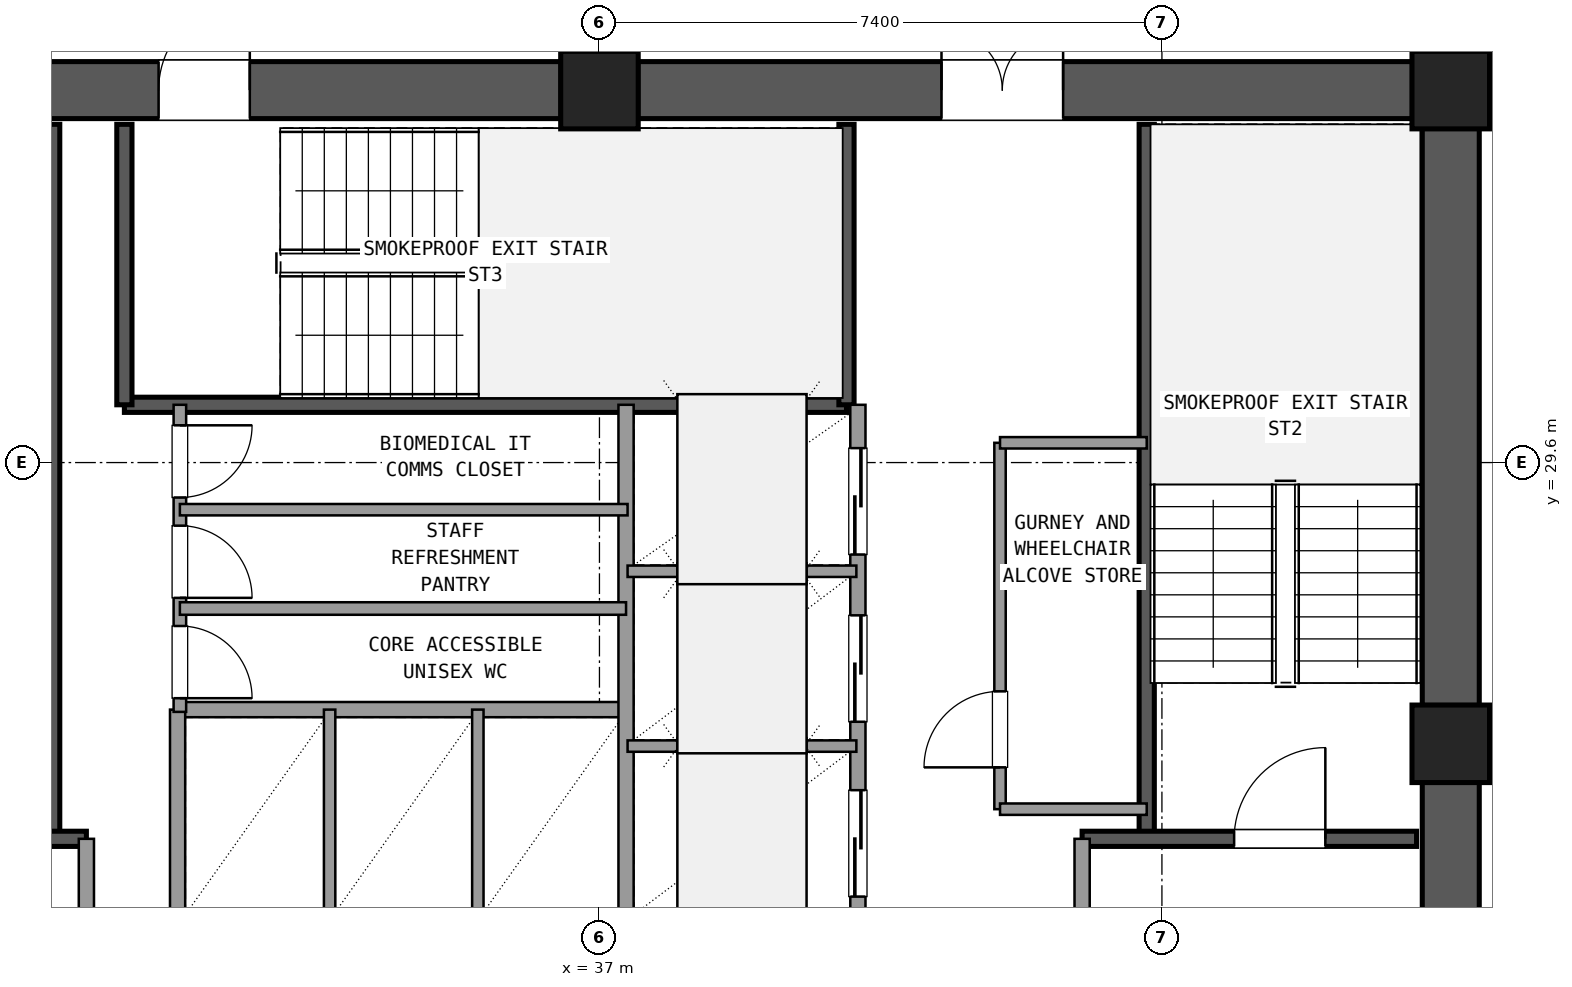
"""IFC4 building model, lengths in metres.
Left out: names, types, materials, properties, quantities, classifications, styles, units other than length and angle.
Written with IfcOpenShell. Run it as: python <this file> out.ifc"""

import sys

from ifc_helpers import new_model, si_unit, direction, frame, frame_2d, origin, origin_2d, place, context, subcontext, project, spatial, rectangle, extrude, element, fill, save


model = new_model("IFC4")
c1 = context("Model", 3, precision=1e-05, world=origin(), true_north=direction((0.0, 1.0)))
c2 = subcontext(c1, "Body", "Model", "MODEL_VIEW")
j1 = project(units=[si_unit("LENGTHUNIT", "METRE"), si_unit("PLANEANGLEUNIT", "RADIAN")], contexts=[c1])
p1 = place(None, origin())
s1 = spatial("IfcSite", under=j1, at=p1, CompositionType="ELEMENT")
p2 = place(p1, origin())
s2 = spatial("IfcBuilding", under=s1, at=p2, CompositionType="ELEMENT")
p3 = place(p2, frame((0.0, 0.0, 174.42)))
s3 = spatial("IfcBuildingStorey", under=s2, at=p3, CompositionType="ELEMENT", Elevation=174.42)
for number, where, z_axis, x_axis in (
    (1, (48.2, 25.9, 0.0), (0.0, 0.0, 1.0), (1.0, 0.0, 0.0)),
    (2, (48.2, 34.5, 0.0), (0.0, 0.0, 1.0), (1.0, 0.0, 0.0)),
    (3, (37.0, 34.5, 0.0), (0.0, 0.0, 1.0), (1.0, 0.0, 0.0)),
):
    element("IfcColumn", number, at=place(p3, frame(where, z_axis=z_axis, x_axis=x_axis)), inside=s3, PredefinedType="COLUMN", context=c2, shape_type="SweptSolid", body=[
        extrude(rectangle(XDim=1.02, YDim=1.02, at=origin_2d()), origin(), (0.0, 0.0, 1.0), 3.6),
    ])
p4 = place(p3, frame((48.2, 17.805, 0.0), z_axis=(0.0, 0.0, 1.0), x_axis=(0.0, 1.0, 0.0)))
e4 = element("IfcWall", 4, at=p4, inside=s3, PredefinedType="SHEAR", context=c2, shape_type="SweptSolid", body=[
    extrude(rectangle(XDim=7.59, YDim=0.75, at=frame_2d((3.795, 0.0))), origin(), (0.0, 0.0, 1.0), 3.3),
])
p5 = place(p4, frame((4.245, 0.0, 0.0)))
e5 = element("IfcOpeningElement", 5, at=p5, cuts=e4, PredefinedType="OPENING", context=c2, shape_type="SweptSolid", body=[
    extrude(rectangle(XDim=1.2, YDim=2.15, at=frame_2d((0.6, 1.075))), frame((0.0, 0.385, 0.0), z_axis=(0.0, -1.0, 0.0), x_axis=(1.0, 0.0, 0.0)), (0.0, 0.0, 1.0), 0.77),
])
p6 = place(p3, frame((48.2, 26.405, 0.0), z_axis=(0.0, 0.0, 1.0), x_axis=(0.0, 1.0, 0.0)))
e6 = element("IfcWall", 6, at=p6, inside=s3, PredefinedType="SHEAR", context=c2, shape_type="SweptSolid", body=[
    extrude(rectangle(XDim=7.59, YDim=0.75, at=frame_2d((3.795, 0.0))), origin(), (0.0, 0.0, 1.0), 3.3),
])
p7 = place(p3, frame((47.695, 34.5, 0.0), z_axis=(0.0, 0.0, 1.0), x_axis=(-1.0, 0.0, 0.0)))
e7 = element("IfcWall", 7, at=p7, inside=s3, PredefinedType="SHEAR", context=c2, shape_type="SweptSolid", body=[
    extrude(rectangle(XDim=10.19, YDim=0.75, at=frame_2d((5.095, 0.0))), origin(), (0.0, 0.0, 1.0), 3.3),
])
p8 = place(p7, frame((4.595, 0.0, 0.0)))
e8 = element("IfcOpeningElement", 8, at=p8, cuts=e7, PredefinedType="OPENING", context=c2, shape_type="SweptSolid", body=[
    extrude(rectangle(XDim=1.6, YDim=2.2, at=frame_2d((0.8, 1.1))), frame((0.0, 0.385, 0.0), z_axis=(0.0, -1.0, 0.0), x_axis=(1.0, 0.0, 0.0)), (0.0, 0.0, 1.0), 0.77),
])
p9 = place(p3, frame((36.495, 34.5, 0.0), z_axis=(0.0, 0.0, 1.0), x_axis=(-1.0, 0.0, 0.0)))
e9 = element("IfcWall", 9, at=p9, inside=s3, PredefinedType="SHEAR", context=c2, shape_type="SweptSolid", body=[
    extrude(rectangle(XDim=10.19, YDim=0.75, at=frame_2d((5.095, 0.0))), origin(), (0.0, 0.0, 1.0), 3.3),
])
p10 = place(p9, frame((4.095, 0.0, 0.0)))
e10 = element("IfcOpeningElement", 10, at=p10, cuts=e9, PredefinedType="OPENING", context=c2, shape_type="SweptSolid", body=[
    extrude(rectangle(XDim=1.2, YDim=2.15, at=frame_2d((0.6, 1.075))), frame((0.0, 0.385, 0.0), z_axis=(0.0, -1.0, 0.0), x_axis=(1.0, 0.0, 0.0)), (0.0, 0.0, 1.0), 0.77),
])
p11 = place(p3, frame((29.8, 24.65, 0.0), z_axis=(0.0, 0.0, 1.0), x_axis=(0.0, 1.0, 0.0)))
e11 = element("IfcWall", 11, at=p11, inside=s3, PredefinedType="SHEAR", context=c2, shape_type="SweptSolid", body=[
    extrude(rectangle(XDim=9.4, YDim=0.2, at=frame_2d((4.7, 0.0))), origin(), (0.0, 0.0, 1.0), 3.3),
])
p12 = place(p3, frame((26.25, 24.65, 0.0), z_axis=(0.0, 0.0, 1.0), x_axis=(1.0, 0.0, 0.0)))
e12 = element("IfcWall", 12, at=p12, inside=s3, PredefinedType="SHEAR", context=c2, shape_type="SweptSolid", body=[
    extrude(rectangle(XDim=4.0, YDim=0.2, at=frame_2d((2.0, 0.0))), origin(), (0.0, 0.0, 1.0), 3.3),
])
p13 = place(p12, frame((1.0, 0.0, 0.0)))
e13 = element("IfcOpeningElement", 13, at=p13, cuts=e12, PredefinedType="OPENING", context=c2, shape_type="SweptSolid", body=[
    extrude(rectangle(XDim=1.2, YDim=2.15, at=frame_2d((0.6, 1.075))), frame((0.0, 0.11, 0.0), z_axis=(0.0, -1.0, 0.0), x_axis=(1.0, 0.0, 0.0)), (0.0, 0.0, 1.0), 0.22),
])
p14 = place(p3, frame((44.2, 24.65, 0.0), z_axis=(0.0, 0.0, 1.0), x_axis=(0.0, 1.0, 0.0)))
e14 = element("IfcWall", 14, at=p14, inside=s3, PredefinedType="SHEAR", context=c2, shape_type="SweptSolid", body=[
    extrude(rectangle(XDim=9.4, YDim=0.2, at=frame_2d((4.7, 0.0))), origin(), (0.0, 0.0, 1.0), 3.3),
])
p15 = place(p3, frame((43.35, 24.65, 0.0), z_axis=(0.0, 0.0, 1.0), x_axis=(1.0, 0.0, 0.0)))
e15 = element("IfcWall", 15, at=p15, inside=s3, PredefinedType="SHEAR", context=c2, shape_type="SweptSolid", body=[
    extrude(rectangle(XDim=4.4, YDim=0.2, at=frame_2d((2.2, 0.0))), origin(), (0.0, 0.0, 1.0), 3.3),
])
p16 = place(p15, frame((2.0, 0.0, 0.0)))
e16 = element("IfcOpeningElement", 16, at=p16, cuts=e15, PredefinedType="OPENING", context=c2, shape_type="SweptSolid", body=[
    extrude(rectangle(XDim=1.2, YDim=2.15, at=frame_2d((0.6, 1.075))), frame((0.0, 0.11, 0.0), z_axis=(0.0, -1.0, 0.0), x_axis=(1.0, 0.0, 0.0)), (0.0, 0.0, 1.0), 0.22),
])
p17 = place(p3, frame((30.75, 30.36, 0.0), z_axis=(0.0, 0.0, 1.0), x_axis=(1.0, 0.0, 0.0)))
e17 = element("IfcWall", 17, at=p17, inside=s3, PredefinedType="SHEAR", context=c2, shape_type="SweptSolid", body=[
    extrude(rectangle(XDim=9.5, YDim=0.2, at=frame_2d((4.75, 0.0))), origin(), (0.0, 0.0, 1.0), 3.3),
])
for number, where, z_axis, x_axis in (
    (18, (30.75, 30.36, 0.0), (0.0, 0.0, 1.0), (0.0, 1.0, 0.0)),
    (19, (40.25, 30.36, 0.0), (0.0, 0.0, 1.0), (0.0, 1.0, 0.0)),
):
    element("IfcWall", number, at=place(p3, frame(where, z_axis=z_axis, x_axis=x_axis)), inside=s3, PredefinedType="SHEAR", context=c2, shape_type="SweptSolid", body=[
        extrude(rectangle(XDim=3.69, YDim=0.2, at=frame_2d((1.845, 0.0))), origin(), (0.0, 0.0, 1.0), 3.3),
    ])
p18 = place(p3, frame((30.25, 17.75, 0.0), z_axis=(0.0, 0.0, 1.0), x_axis=(0.0, 1.0, 0.0)))
e20 = element("IfcWall", 20, at=p18, inside=s3, PredefinedType="SOLIDWALL", context=c2, shape_type="SweptSolid", body=[
    extrude(rectangle(XDim=6.9, YDim=0.2, at=frame_2d((3.45, 0.0))), origin(), (0.0, 0.0, 1.0), 2.59),
])
p19 = place(p18, frame((4.15, 0.0, 0.0)))
e21 = element("IfcOpeningElement", 21, at=p19, cuts=e20, PredefinedType="OPENING", context=c2, shape_type="SweptSolid", body=[
    extrude(rectangle(XDim=1.2, YDim=2.15, at=frame_2d((0.6, 1.075))), frame((0.0, 0.11, 0.0), z_axis=(0.0, -1.0, 0.0), x_axis=(1.0, 0.0, 0.0)), (0.0, 0.0, 1.0), 0.22),
])
p20 = place(p3, frame((43.35, 17.75, 0.0), z_axis=(0.0, 0.0, 1.0), x_axis=(0.0, 1.0, 0.0)))
e22 = element("IfcWall", 22, at=p20, inside=s3, PredefinedType="SOLIDWALL", context=c2, shape_type="SweptSolid", body=[
    extrude(rectangle(XDim=6.9, YDim=0.2, at=frame_2d((3.45, 0.0))), origin(), (0.0, 0.0, 1.0), 2.59),
])
p21 = place(p20, frame((4.15, 0.0, 0.0)))
e23 = element("IfcOpeningElement", 23, at=p21, cuts=e22, PredefinedType="OPENING", context=c2, shape_type="SweptSolid", body=[
    extrude(rectangle(XDim=1.2, YDim=2.15, at=frame_2d((0.6, 1.075))), frame((0.0, 0.11, 0.0), z_axis=(0.0, -1.0, 0.0), x_axis=(1.0, 0.0, 0.0)), (0.0, 0.0, 1.0), 0.22),
])
p22 = place(p3, frame((31.45, 26.35, 0.0), z_axis=(0.0, 0.0, 1.0), x_axis=(1.0, 0.0, 0.0)))
e24 = element("IfcWall", 24, at=p22, inside=s3, PredefinedType="SOLIDWALL", context=c2, shape_type="SweptSolid", body=[
    extrude(rectangle(XDim=5.9, YDim=0.2, at=frame_2d((2.95, 0.0))), origin(), (0.0, 0.0, 1.0), 2.59),
])
p23 = place(p3, frame((31.45, 23.54, 0.0), z_axis=(0.0, 0.0, 1.0), x_axis=(0.0, 1.0, 0.0)))
e25 = element("IfcWall", 25, at=p23, inside=s3, PredefinedType="SOLIDWALL", context=c2, shape_type="SweptSolid", body=[
    extrude(rectangle(XDim=2.81, YDim=0.2, at=frame_2d((1.405, 0.0))), origin(), (0.0, 0.0, 1.0), 2.59),
])
for number, where, z_axis, x_axis in (
    (26, (33.45, 23.54, 0.0), (0.0, 0.0, 1.0), (0.0, 1.0, 0.0)),
    (27, (35.4, 23.54, 0.0), (0.0, 0.0, 1.0), (0.0, 1.0, 0.0)),
):
    element("IfcWall", number, at=place(p3, frame(where, z_axis=z_axis, x_axis=x_axis)), inside=s3, PredefinedType="PARTITIONING", context=c2, shape_type="SweptSolid", body=[
        extrude(rectangle(XDim=2.81, YDim=0.15, at=frame_2d((1.405, 0.0))), origin(), (0.0, 0.0, 1.0), 2.59),
    ])
p24 = place(p3, frame((37.35, 23.54, 0.0), z_axis=(0.0, 0.0, 1.0), x_axis=(0.0, 1.0, 0.0)))
e28 = element("IfcWall", 28, at=p24, inside=s3, PredefinedType="SOLIDWALL", context=c2, shape_type="SweptSolid", body=[
    extrude(rectangle(XDim=6.82, YDim=0.2, at=frame_2d((3.41, 0.0))), origin(), (0.0, 0.0, 1.0), 2.59),
])
p25 = place(p3, frame((40.4, 23.54, 0.0), z_axis=(0.0, 0.0, 1.0), x_axis=(0.0, 1.0, 0.0)))
e29 = element("IfcWall", 29, at=p25, inside=s3, PredefinedType="SOLIDWALL", context=c2, shape_type="SweptSolid", body=[
    extrude(rectangle(XDim=6.82, YDim=0.2, at=frame_2d((3.41, 0.0))), origin(), (0.0, 0.0, 1.0), 2.59),
])
p26 = place(p25, frame((0.35, 0.0, 0.0)))
e30 = element("IfcOpeningElement", 30, at=p26, cuts=e29, PredefinedType="OPENING", context=c2, shape_type="SweptSolid", body=[
    extrude(rectangle(XDim=1.4, YDim=2.2, at=frame_2d((0.7, 1.1))), frame((0.0, 0.11, 0.0), z_axis=(0.0, -1.0, 0.0), x_axis=(1.0, 0.0, 0.0)), (0.0, 0.0, 1.0), 0.22),
])
p27 = place(p25, frame((2.65, 0.0, 0.0)))
e31 = element("IfcOpeningElement", 31, at=p27, cuts=e29, PredefinedType="OPENING", context=c2, shape_type="SweptSolid", body=[
    extrude(rectangle(XDim=1.4, YDim=2.2, at=frame_2d((0.7, 1.1))), frame((0.0, 0.11, 0.0), z_axis=(0.0, -1.0, 0.0), x_axis=(1.0, 0.0, 0.0)), (0.0, 0.0, 1.0), 0.22),
])
p28 = place(p25, frame((4.85, 0.0, 0.0)))
e32 = element("IfcOpeningElement", 32, at=p28, cuts=e29, PredefinedType="OPENING", context=c2, shape_type="SweptSolid", body=[
    extrude(rectangle(XDim=1.4, YDim=2.2, at=frame_2d((0.7, 1.1))), frame((0.0, 0.11, 0.0), z_axis=(0.0, -1.0, 0.0), x_axis=(1.0, 0.0, 0.0)), (0.0, 0.0, 1.0), 0.22),
])
for number, where, z_axis, x_axis in (
    (33, (37.37, 25.87, 0.0), (0.0, 0.0, 1.0), (1.0, 0.0, 0.0)),
    (34, (37.37, 28.17, 0.0), (0.0, 0.0, 1.0), (1.0, 0.0, 0.0)),
):
    element("IfcWall", number, at=place(p3, frame(where, z_axis=z_axis, x_axis=x_axis)), inside=s3, PredefinedType="PARTITIONING", context=c2, shape_type="SweptSolid", body=[
        extrude(rectangle(XDim=3.01, YDim=0.15, at=frame_2d((1.505, 0.0))), origin(), (0.0, 0.0, 1.0), 2.59),
    ])
p29 = place(p3, frame((42.27, 25.04, 0.0), z_axis=(0.0, 0.0, 1.0), x_axis=(0.0, 1.0, 0.0)))
e35 = element("IfcWall", 35, at=p29, inside=s3, PredefinedType="PARTITIONING", context=c2, shape_type="SweptSolid", body=[
    extrude(rectangle(XDim=4.82, YDim=0.15, at=frame_2d((2.41, 0.0))), origin(), (0.0, 0.0, 1.0), 2.59),
])
p30 = place(p29, frame((0.55, 0.0, 0.0)))
e36 = element("IfcOpeningElement", 36, at=p30, cuts=e35, PredefinedType="OPENING", context=c2, shape_type="SweptSolid", body=[
    extrude(rectangle(XDim=1.0, YDim=2.15, at=frame_2d((0.5, 1.075))), frame((0.0, 0.085, 0.0), z_axis=(0.0, -1.0, 0.0), x_axis=(1.0, 0.0, 0.0)), (0.0, 0.0, 1.0), 0.17),
])
for number, where, z_axis, x_axis in (
    (37, (42.27, 25.04, 0.0), (0.0, 0.0, 1.0), (1.0, 0.0, 0.0)),
    (38, (42.27, 29.86, 0.0), (0.0, 0.0, 1.0), (1.0, 0.0, 0.0)),
):
    element("IfcWall", number, at=place(p3, frame(where, z_axis=z_axis, x_axis=x_axis)), inside=s3, PredefinedType="PARTITIONING", context=c2, shape_type="SweptSolid", body=[
        extrude(rectangle(XDim=1.93, YDim=0.15, at=frame_2d((0.965, 0.0))), origin(), (0.0, 0.0, 1.0), 2.59),
    ])
p31 = place(p3, frame((31.48, 26.32, 0.0), z_axis=(0.0, 0.0, 1.0), x_axis=(0.0, 1.0, 0.0)))
e39 = element("IfcWall", 39, at=p31, inside=s3, PredefinedType="PLUMBINGWALL", context=c2, shape_type="SweptSolid", body=[
    extrude(rectangle(XDim=4.04, YDim=0.165, at=frame_2d((2.02, 0.0))), origin(), (0.0, 0.0, 1.0), 2.59),
])
p32 = place(p31, frame((0.18, 0.0, 0.0)))
e40 = element("IfcOpeningElement", 40, at=p32, cuts=e39, PredefinedType="OPENING", context=c2, shape_type="SweptSolid", body=[
    extrude(rectangle(XDim=0.95, YDim=2.1, at=frame_2d((0.475, 1.05))), frame((0.0, 0.093, 0.0), z_axis=(0.0, -1.0, 0.0), x_axis=(1.0, 0.0, 0.0)), (0.0, 0.0, 1.0), 0.185),
])
p33 = place(p31, frame((1.5, 0.0, 0.0)))
e41 = element("IfcOpeningElement", 41, at=p33, cuts=e39, PredefinedType="OPENING", context=c2, shape_type="SweptSolid", body=[
    extrude(rectangle(XDim=0.95, YDim=2.1, at=frame_2d((0.475, 1.05))), frame((0.0, 0.093, 0.0), z_axis=(0.0, -1.0, 0.0), x_axis=(1.0, 0.0, 0.0)), (0.0, 0.0, 1.0), 0.185),
])
p34 = place(p31, frame((2.82, 0.0, 0.0)))
e42 = element("IfcOpeningElement", 42, at=p34, cuts=e39, PredefinedType="OPENING", context=c2, shape_type="SweptSolid", body=[
    extrude(rectangle(XDim=0.95, YDim=2.1, at=frame_2d((0.475, 1.05))), frame((0.0, 0.093, 0.0), z_axis=(0.0, -1.0, 0.0), x_axis=(1.0, 0.0, 0.0)), (0.0, 0.0, 1.0), 0.185),
])
p35 = place(p3, frame((31.48, 27.68, 0.0), z_axis=(0.0, 0.0, 1.0), x_axis=(1.0, 0.0, 0.0)))
e43 = element("IfcWall", 43, at=p35, inside=s3, PredefinedType="PLUMBINGWALL", context=c2, shape_type="SweptSolid", body=[
    extrude(rectangle(XDim=5.87, YDim=0.165, at=frame_2d((2.935, 0.0))), origin(), (0.0, 0.0, 1.0), 2.59),
])
p36 = place(p3, frame((31.48, 28.98, 0.0), z_axis=(0.0, 0.0, 1.0), x_axis=(1.0, 0.0, 0.0)))
e44 = element("IfcWall", 44, at=p36, inside=s3, PredefinedType="PARTITIONING", context=c2, shape_type="SweptSolid", body=[
    extrude(rectangle(XDim=5.89, YDim=0.15, at=frame_2d((2.945, 0.0))), origin(), (0.0, 0.0, 1.0), 2.59),
])
p37 = place(p3, frame((37.0, 34.95, 0.0), z_axis=(0.0, 0.0, 1.0), x_axis=(0.0, 1.0, 0.0)))
e45 = element("IfcWall", 45, at=p37, inside=s3, PredefinedType="PARTITIONING", context=c2, shape_type="SweptSolid", body=[
    extrude(rectangle(XDim=3.21, YDim=0.18, at=frame_2d((1.605, 0.0))), origin(), (0.0, 0.0, 1.0), 2.59),
])
p38 = place(p37, frame((0.605, 0.0, 0.0)))
e46 = element("IfcOpeningElement", 46, at=p38, cuts=e45, PredefinedType="OPENING", context=c2, shape_type="SweptSolid", body=[
    extrude(rectangle(XDim=2.0, YDim=2.2, at=frame_2d((1.0, 1.1))), frame((0.0, 0.1, 0.0), z_axis=(0.0, -1.0, 0.0), x_axis=(1.0, 0.0, 0.0)), (0.0, 0.0, 1.0), 0.2),
])
p39 = place(p16, origin())
e47 = element("IfcDoor", 47, at=p39, inside=s3, OperationType="SINGLE_SWING_RIGHT", PredefinedType="DOOR", context=c2, shape_type="SweptSolid", body=[
    extrude(rectangle(XDim=1.2, YDim=2.15, at=frame_2d((0.6, 1.075))), frame((0.0, 0.025, 0.0), z_axis=(0.0, -1.0, 0.0), x_axis=(1.0, 0.0, 0.0)), (0.0, 0.0, 1.0), 0.05),
])
fill(e16, e47)
p40 = place(p8, frame((1.6, 0.0, 0.0), z_axis=(0.0, 0.0, 1.0), x_axis=(-1.0, 0.0, 0.0)))
e48 = element("IfcDoor", 48, at=p40, inside=s3, OperationType="DOUBLE_DOOR_SINGLE_SWING", PredefinedType="DOOR", context=c2, shape_type="SweptSolid", body=[
    extrude(rectangle(XDim=1.6, YDim=2.2, at=frame_2d((0.8, 1.1))), frame((0.0, 0.025, 0.0), z_axis=(0.0, -1.0, 0.0), x_axis=(1.0, 0.0, 0.0)), (0.0, 0.0, 1.0), 0.05),
])
fill(e8, e48)
p41 = place(p10, frame((1.2, 0.0, 0.0), z_axis=(0.0, 0.0, 1.0), x_axis=(-1.0, 0.0, 0.0)))
e49 = element("IfcDoor", 49, at=p41, inside=s3, OperationType="SINGLE_SWING_LEFT", PredefinedType="DOOR", context=c2, shape_type="SweptSolid", body=[
    extrude(rectangle(XDim=1.2, YDim=2.15, at=frame_2d((0.6, 1.075))), frame((0.0, 0.025, 0.0), z_axis=(0.0, -1.0, 0.0), x_axis=(1.0, 0.0, 0.0)), (0.0, 0.0, 1.0), 0.05),
])
fill(e10, e49)
p42 = place(p26, origin())
e50 = element("IfcDoor", 50, at=p42, inside=s3, OperationType="SLIDING_TO_LEFT", PredefinedType="DOOR", context=c2, shape_type="SweptSolid", body=[
    extrude(rectangle(XDim=1.4, YDim=2.2, at=frame_2d((0.7, 1.1))), frame((0.0, 0.025, 0.0), z_axis=(0.0, -1.0, 0.0), x_axis=(1.0, 0.0, 0.0)), (0.0, 0.0, 1.0), 0.05),
])
fill(e30, e50)
p43 = place(p27, origin())
e51 = element("IfcDoor", 51, at=p43, inside=s3, OperationType="SLIDING_TO_LEFT", PredefinedType="DOOR", context=c2, shape_type="SweptSolid", body=[
    extrude(rectangle(XDim=1.4, YDim=2.2, at=frame_2d((0.7, 1.1))), frame((0.0, 0.025, 0.0), z_axis=(0.0, -1.0, 0.0), x_axis=(1.0, 0.0, 0.0)), (0.0, 0.0, 1.0), 0.05),
])
fill(e31, e51)
p44 = place(p28, origin())
e52 = element("IfcDoor", 52, at=p44, inside=s3, OperationType="SLIDING_TO_RIGHT", PredefinedType="DOOR", context=c2, shape_type="SweptSolid", body=[
    extrude(rectangle(XDim=1.4, YDim=2.2, at=frame_2d((0.7, 1.1))), frame((0.0, 0.025, 0.0), z_axis=(0.0, -1.0, 0.0), x_axis=(1.0, 0.0, 0.0)), (0.0, 0.0, 1.0), 0.05),
])
fill(e32, e52)
p45 = place(p30, origin())
e53 = element("IfcDoor", 53, at=p45, inside=s3, OperationType="SINGLE_SWING_LEFT", PredefinedType="DOOR", context=c2, shape_type="SweptSolid", body=[
    extrude(rectangle(XDim=1.0, YDim=2.15, at=frame_2d((0.5, 1.075))), frame((0.0, 0.025, 0.0), z_axis=(0.0, -1.0, 0.0), x_axis=(1.0, 0.0, 0.0)), (0.0, 0.0, 1.0), 0.05),
])
fill(e36, e53)
p46 = place(p32, frame((0.95, 0.0, 0.0), z_axis=(0.0, 0.0, 1.0), x_axis=(-1.0, 0.0, 0.0)))
e54 = element("IfcDoor", 54, at=p46, inside=s3, OperationType="SINGLE_SWING_LEFT", PredefinedType="DOOR", context=c2, shape_type="SweptSolid", body=[
    extrude(rectangle(XDim=0.95, YDim=2.1, at=frame_2d((0.475, 1.05))), frame((0.0, 0.025, 0.0), z_axis=(0.0, -1.0, 0.0), x_axis=(1.0, 0.0, 0.0)), (0.0, 0.0, 1.0), 0.05),
])
fill(e40, e54)
p47 = place(p33, frame((0.95, 0.0, 0.0), z_axis=(0.0, 0.0, 1.0), x_axis=(-1.0, 0.0, 0.0)))
e55 = element("IfcDoor", 55, at=p47, inside=s3, OperationType="SINGLE_SWING_LEFT", PredefinedType="DOOR", context=c2, shape_type="SweptSolid", body=[
    extrude(rectangle(XDim=0.95, YDim=2.1, at=frame_2d((0.475, 1.05))), frame((0.0, 0.025, 0.0), z_axis=(0.0, -1.0, 0.0), x_axis=(1.0, 0.0, 0.0)), (0.0, 0.0, 1.0), 0.05),
])
fill(e41, e55)
p48 = place(p34, frame((0.95, 0.0, 0.0), z_axis=(0.0, 0.0, 1.0), x_axis=(-1.0, 0.0, 0.0)))
e56 = element("IfcDoor", 56, at=p48, inside=s3, OperationType="SINGLE_SWING_RIGHT", PredefinedType="DOOR", context=c2, shape_type="SweptSolid", body=[
    extrude(rectangle(XDim=0.95, YDim=2.1, at=frame_2d((0.475, 1.05))), frame((0.0, 0.025, 0.0), z_axis=(0.0, -1.0, 0.0), x_axis=(1.0, 0.0, 0.0)), (0.0, 0.0, 1.0), 0.05),
])
fill(e42, e56)
save(model, sys.argv[1])
